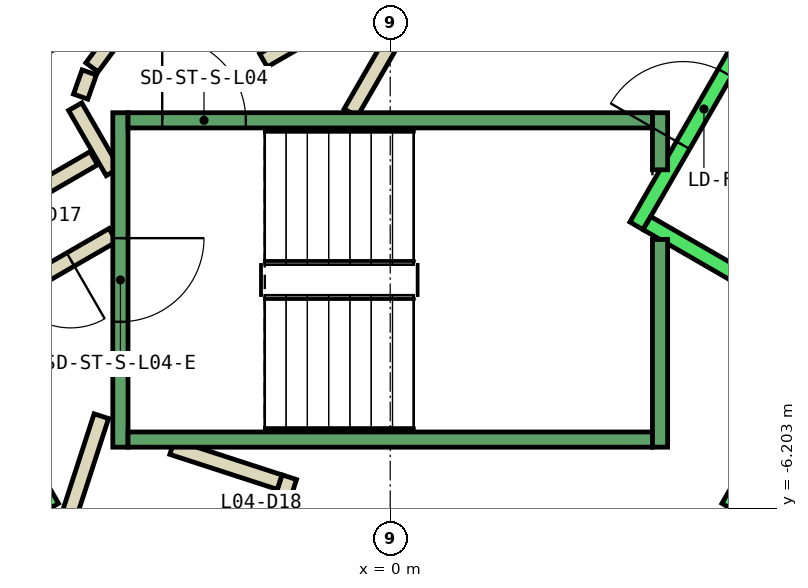
"""IFC4 building model, lengths in metres.
Left out: names, types, materials, properties, quantities, classifications, styles, units other than length and angle.
Written with IfcOpenShell. Run it as: python <this file> out.ifc"""

import sys

from ifc_helpers import new_model, si_unit, direction, frame, frame_2d, origin, place, context, subcontext, project, spatial, rectangle, extrude, element, fill, save


model = new_model("IFC4")
c1 = context("Model", 3, precision=1e-05, world=origin(), true_north=direction((0.0, 1.0)))
c2 = subcontext(c1, "Body", "Model", "MODEL_VIEW")
j1 = project(units=[si_unit("LENGTHUNIT", "METRE"), si_unit("PLANEANGLEUNIT", "RADIAN")], contexts=[c1])
p1 = place(None, origin())
s1 = spatial("IfcSite", under=j1, at=p1, CompositionType="ELEMENT")
p2 = place(p1, origin())
s2 = spatial("IfcBuilding", under=s1, at=p2, CompositionType="ELEMENT")
p3 = place(p2, frame((0.0, 0.0, 25.0)))
s3 = spatial("IfcBuildingStorey", under=s2, at=p3, CompositionType="ELEMENT", Elevation=25.0)
p4 = place(p3, frame((-3.9, -1.599, 0.0), z_axis=(0.0, 0.0, 1.0), x_axis=(-0.865969445389, -0.500096910261, 0.0)))
e1 = element("IfcWall", 1, at=p4, inside=s3, PredefinedType="PARTITIONING", context=c2, shape_type="SweptSolid", body=[
    extrude(rectangle(XDim=1.373, YDim=0.2, at=frame_2d((0.687, 0.0))), origin(), (0.0, 0.0, 1.0), 4.55),
])
p5 = place(p3, frame((-4.145, -0.92, 0.0), z_axis=(0.0, 0.0, 1.0), x_axis=(0.499743786207, -0.866173278362, 0.0)))
e2 = element("IfcWall", 2, at=p5, inside=s3, PredefinedType="PARTITIONING", context=c2, shape_type="SweptSolid", body=[
    extrude(rectangle(XDim=0.991, YDim=0.2, at=frame_2d((0.495, 0.0))), origin(), (0.0, 0.0, 1.0), 4.55),
])
p6 = place(p3, frame((-3.65, -2.61, 0.0), z_axis=(0.0, 0.0, 1.0), x_axis=(-0.866072462134, -0.499918483688, 0.0)))
e3 = element("IfcWall", 3, at=p6, inside=s3, PredefinedType="PARTITIONING", context=c2, shape_type="SweptSolid", body=[
    extrude(rectangle(XDim=2.084, YDim=0.2, at=frame_2d((1.042, 0.0))), origin(), (0.0, 0.0, 1.0), 4.55),
])
p7 = place(p6, frame((0.642, 0.0, 0.0)))
e4 = element("IfcOpeningElement", 4, at=p7, cuts=e3, PredefinedType="OPENING", context=c2, shape_type="SweptSolid", body=[
    extrude(rectangle(XDim=0.9, YDim=2.1, at=frame_2d((0.45, 1.05))), frame((0.0, 0.11, 0.0), z_axis=(0.0, -1.0, 0.0), x_axis=(1.0, 0.0, 0.0)), (0.0, 0.0, 1.0), 0.22),
])
p8 = place(p3, frame((-3.801, -4.992, 0.0), z_axis=(0.0, 0.0, 1.0), x_axis=(-0.309079173229, -0.951036310914, 0.0)))
e5 = element("IfcWall", 5, at=p8, inside=s3, PredefinedType="PARTITIONING", context=c2, shape_type="SweptSolid", body=[
    extrude(rectangle(XDim=2.4, YDim=0.2, at=frame_2d((1.2, 0.0))), origin(), (0.0, 0.0, 1.0), 4.55),
])
p9 = place(p3, frame((-2.07, -8.078, 0.0), z_axis=(0.0, 0.0, 1.0), x_axis=(0.309171157328, 0.951006411901, 0.0)))
e6 = element("IfcWall", 6, at=p9, inside=s3, PredefinedType="PARTITIONING", context=c2, shape_type="SweptSolid", body=[
    extrude(rectangle(XDim=2.401, YDim=0.2, at=frame_2d((1.2, 0.0))), origin(), (0.0, 0.0, 1.0), 4.55),
])
p10 = place(p9, frame((0.75, 0.0, 0.0)))
e7 = element("IfcOpeningElement", 7, at=p10, cuts=e6, PredefinedType="OPENING", context=c2, shape_type="SweptSolid", body=[
    extrude(rectangle(XDim=0.9, YDim=2.1, at=frame_2d((0.45, 1.05))), frame((0.0, 0.11, 0.0), z_axis=(0.0, -1.0, 0.0), x_axis=(1.0, 0.0, 0.0)), (0.0, 0.0, 1.0), 0.22),
])
p11 = place(p3, frame((-1.455, -5.86, 0.0), z_axis=(0.0, 0.0, 1.0), x_axis=(-0.950892787506, 0.309520446287, 0.0)))
e8 = element("IfcWall", 8, at=p11, inside=s3, PredefinedType="PARTITIONING", context=c2, shape_type="SweptSolid", body=[
    extrude(rectangle(XDim=1.487, YDim=0.2, at=frame_2d((0.743, 0.0))), origin(), (0.0, 0.0, 1.0), 4.55),
])
p12 = place(p3, frame((-0.52, -1.0, 0.0), z_axis=(0.0, 0.0, 1.0), x_axis=(0.50011622646, 0.865958290007, 0.0)))
e9 = element("IfcWall", 9, at=p12, inside=s3, PredefinedType="PARTITIONING", context=c2, shape_type="SweptSolid", body=[
    extrude(rectangle(XDim=4.991, YDim=0.2, at=frame_2d((2.496, 0.0))), origin(), (0.0, 0.0, 1.0), 4.55),
])
p13 = place(p12, frame((1.945, 0.0, 0.0)))
e10 = element("IfcOpeningElement", 10, at=p13, cuts=e9, PredefinedType="OPENING", context=c2, shape_type="SweptSolid", body=[
    extrude(rectangle(XDim=1.0, YDim=2.1, at=frame_2d((0.5, 1.05))), frame((0.0, 0.11, 0.0), z_axis=(0.0, -1.0, 0.0), x_axis=(1.0, 0.0, 0.0)), (0.0, 0.0, 1.0), 0.22),
])
p14 = place(p3, frame((-0.412, 0.414, 0.0), z_axis=(0.0, 0.0, 1.0), x_axis=(-0.866017369001, -0.500013916395, 0.0)))
e11 = element("IfcWall", 11, at=p14, inside=s3, PredefinedType="PARTITIONING", context=c2, shape_type="SweptSolid", body=[
    extrude(rectangle(XDim=1.45, YDim=0.2, at=frame_2d((0.725, 0.0))), origin(), (0.0, 0.0, 1.0), 4.55),
])
p15 = place(p3, frame((-3.723, -0.131, 0.0), z_axis=(0.0, 0.0, 1.0), x_axis=(-0.594675113454, -0.803966112121, 0.0)))
e12 = element("IfcWall", 12, at=p15, inside=s3, PredefinedType="PARTITIONING", context=c2, shape_type="SweptSolid", body=[
    extrude(rectangle(XDim=0.338, YDim=0.2, at=frame_2d((0.169, 0.0))), origin(), (0.0, 0.0, 1.0), 4.55),
])
p16 = place(p3, frame((-3.96, -0.47, 0.0), z_axis=(0.0, 0.0, 1.0), x_axis=(-0.334824194261, -0.942280615813, 0.0)))
e13 = element("IfcWall", 13, at=p16, inside=s3, PredefinedType="PARTITIONING", context=c2, shape_type="SweptSolid", body=[
    extrude(rectangle(XDim=0.338, YDim=0.2, at=frame_2d((0.169, 0.0))), origin(), (0.0, 0.0, 1.0), 4.55),
])
p17 = place(p3, frame((-9.751, 2.99, 0.0), z_axis=(0.0, 0.0, 1.0), x_axis=(0.50000090737, -0.866024879913, 0.0)))
e14 = element("IfcWall", 14, at=p17, inside=s3, PredefinedType="STANDARD", context=c2, shape_type="SweptSolid", body=[
    extrude(rectangle(XDim=10.6, YDim=0.2, at=frame_2d((5.3, 0.0))), origin(), (0.0, 0.0, 1.0), 4.55),
])
p18 = place(p3, frame((3.24, -2.488, 0.0), z_axis=(0.0, 0.0, 1.0), x_axis=(0.49994636267, 0.866056369097, 0.0)))
e15 = element("IfcWall", 15, at=p18, inside=s3, PredefinedType="STANDARD", context=c2, shape_type="SweptSolid", body=[
    extrude(rectangle(XDim=2.8, YDim=0.2, at=frame_2d((1.4, 0.0))), origin(), (0.0, 0.0, 1.0), 4.55),
])
p19 = place(p18, frame((1.225, 0.0, 0.0)))
e16 = element("IfcOpeningElement", 16, at=p19, cuts=e15, PredefinedType="OPENING", context=c2, shape_type="SweptSolid", body=[
    extrude(rectangle(XDim=1.1, YDim=2.1, at=frame_2d((0.55, 1.05))), frame((0.0, 0.11, 0.0), z_axis=(0.0, -1.0, 0.0), x_axis=(1.0, 0.0, 0.0)), (0.0, 0.0, 1.0), 0.22),
])
p20 = place(p3, frame((3.377, -2.452, 0.0), z_axis=(0.0, 0.0, 1.0), x_axis=(0.865955154139, -0.50012165622, 0.0)))
e17 = element("IfcWall", 17, at=p20, inside=s3, PredefinedType="STANDARD", context=c2, shape_type="SweptSolid", body=[
    extrude(rectangle(XDim=2.4, YDim=0.2, at=frame_2d((1.2, 0.0))), origin(), (0.0, 0.0, 1.0), 4.55),
])
p21 = place(p3, frame((4.451, -6.19, 0.0), z_axis=(0.0, 0.0, 1.0), x_axis=(0.50000090737, 0.866024879913, 0.0)))
e18 = element("IfcWall", 18, at=p21, inside=s3, PredefinedType="STANDARD", context=c2, shape_type="SweptSolid", body=[
    extrude(rectangle(XDim=10.6, YDim=0.2, at=frame_2d((5.3, 0.0))), origin(), (0.0, 0.0, 1.0), 4.55),
])
p22 = place(p3, frame((-3.55, -1.0, 0.0), z_axis=(0.0, 0.0, 1.0), x_axis=(0.0, -1.0, 0.0)))
e19 = element("IfcWall", 19, at=p22, inside=s3, PredefinedType="STANDARD", context=c2, shape_type="SweptSolid", body=[
    extrude(rectangle(XDim=4.4, YDim=0.2, at=frame_2d((2.2, 0.0))), origin(), (0.0, 0.0, 1.0), 4.55),
])
p23 = place(p22, frame((1.65, 0.0, 0.0)))
e20 = element("IfcOpeningElement", 20, at=p23, cuts=e19, PredefinedType="OPENING", context=c2, shape_type="SweptSolid", body=[
    extrude(rectangle(XDim=1.1, YDim=2.2, at=frame_2d((0.55, 1.1))), frame((0.0, 0.11, 0.0), z_axis=(0.0, -1.0, 0.0), x_axis=(1.0, 0.0, 0.0)), (0.0, 0.0, 1.0), 0.22),
])
p24 = place(p3, frame((3.55, -2.667, 0.0), z_axis=(0.0, 0.0, 1.0), x_axis=(0.0, -1.0, 0.0)))
e21 = element("IfcWall", 21, at=p24, inside=s3, PredefinedType="STANDARD", context=c2, shape_type="SweptSolid", body=[
    extrude(rectangle(XDim=2.733, YDim=0.2, at=frame_2d((1.366, 0.0))), origin(), (0.0, 0.0, 1.0), 4.55),
])
p25 = place(p3, frame((3.55, -1.0, 0.0), z_axis=(0.0, 0.0, 1.0), x_axis=(0.0, -1.0, 0.0)))
e22 = element("IfcWall", 22, at=p25, inside=s3, PredefinedType="STANDARD", context=c2, shape_type="SweptSolid", body=[
    extrude(rectangle(XDim=0.751, YDim=0.2, at=frame_2d((0.375, 0.0))), origin(), (0.0, 0.0, 1.0), 4.55),
])
p26 = place(p3, frame((-3.45, -1.1, 0.0), z_axis=(0.0, 0.0, 1.0), x_axis=(1.0, 0.0, 0.0)))
e23 = element("IfcWall", 23, at=p26, inside=s3, PredefinedType="STANDARD", context=c2, shape_type="SweptSolid", body=[
    extrude(rectangle(XDim=6.9, YDim=0.2, at=frame_2d((3.45, 0.0))), origin(), (0.0, 0.0, 1.0), 4.55),
])
p27 = place(p26, frame((0.45, 0.0, 0.0)))
e24 = element("IfcOpeningElement", 24, at=p27, cuts=e23, PredefinedType="OPENING", context=c2, shape_type="SweptSolid", body=[
    extrude(rectangle(XDim=1.1, YDim=2.2, at=frame_2d((0.55, 1.1))), frame((0.0, 0.11, 0.0), z_axis=(0.0, -1.0, 0.0), x_axis=(1.0, 0.0, 0.0)), (0.0, 0.0, 1.0), 0.22),
])
p28 = place(p3, frame((-3.45, -5.3, 0.0), z_axis=(0.0, 0.0, 1.0), x_axis=(1.0, 0.0, 0.0)))
e25 = element("IfcWall", 25, at=p28, inside=s3, PredefinedType="STANDARD", context=c2, shape_type="SweptSolid", body=[
    extrude(rectangle(XDim=6.9, YDim=0.2, at=frame_2d((3.45, 0.0))), origin(), (0.0, 0.0, 1.0), 4.55),
])
p29 = place(p7, origin())
e26 = element("IfcDoor", 26, at=p29, inside=s3, OperationType="SINGLE_SWING_LEFT", PredefinedType="DOOR", context=c2, shape_type="SweptSolid", body=[
    extrude(rectangle(XDim=0.9, YDim=2.1, at=frame_2d((0.45, 1.05))), frame((0.0, 0.025, 0.0), z_axis=(0.0, -1.0, 0.0), x_axis=(1.0, 0.0, 0.0)), (0.0, 0.0, 1.0), 0.05),
])
fill(e4, e26)
p30 = place(p19, origin())
e27 = element("IfcDoor", 27, at=p30, inside=s3, OperationType="SLIDING_TO_LEFT", PredefinedType="DOOR", context=c2, shape_type="SweptSolid", body=[
    extrude(rectangle(XDim=1.1, YDim=2.1, at=frame_2d((0.55, 1.05))), frame((0.0, 0.025, 0.0), z_axis=(0.0, -1.0, 0.0), x_axis=(1.0, 0.0, 0.0)), (0.0, 0.0, 1.0), 0.05),
])
fill(e16, e27)
p31 = place(p27, origin())
e28 = element("IfcDoor", 28, at=p31, inside=s3, OperationType="SINGLE_SWING_LEFT", PredefinedType="DOOR", context=c2, shape_type="SweptSolid", body=[
    extrude(rectangle(XDim=1.1, YDim=2.2, at=frame_2d((0.55, 1.1))), frame((0.0, 0.025, 0.0), z_axis=(0.0, -1.0, 0.0), x_axis=(1.0, 0.0, 0.0)), (0.0, 0.0, 1.0), 0.05),
])
fill(e24, e28)
p32 = place(p23, origin())
e29 = element("IfcDoor", 29, at=p32, inside=s3, OperationType="SINGLE_SWING_LEFT", PredefinedType="DOOR", context=c2, shape_type="SweptSolid", body=[
    extrude(rectangle(XDim=1.1, YDim=2.2, at=frame_2d((0.55, 1.1))), frame((0.0, 0.025, 0.0), z_axis=(0.0, -1.0, 0.0), x_axis=(1.0, 0.0, 0.0)), (0.0, 0.0, 1.0), 0.05),
])
fill(e20, e29)
save(model, sys.argv[1])
